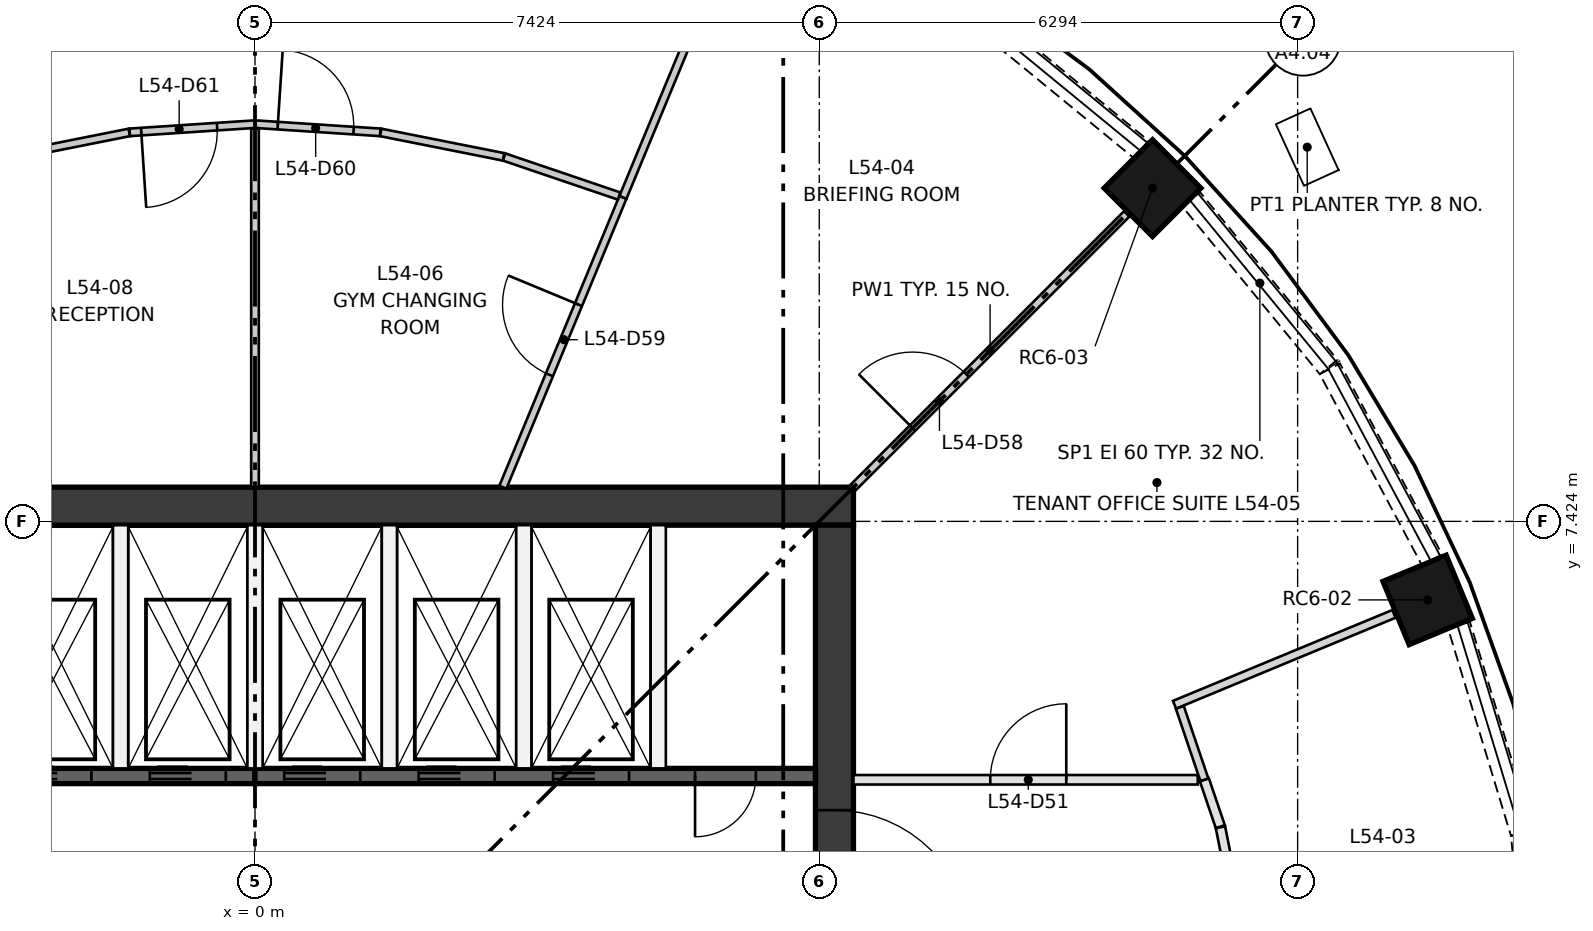
"""IFC4 building model, lengths in metres.
Left out: names, types, materials, properties, quantities, classifications, styles, units other than length and angle.
Written with IfcOpenShell. Run it as: python <this file> out.ifc"""

import sys

from ifc_helpers import new_model, si_unit, direction, frame, frame_2d, origin, origin_2d, place, context, subcontext, project, spatial, rectangle, extrude, element, fill, save


model = new_model("IFC4")
c1 = context("Model", 3, precision=1e-05, world=origin(), true_north=direction((0.0, 1.0)))
c2 = subcontext(c1, "Body", "Model", "MODEL_VIEW")
j1 = project(units=[si_unit("LENGTHUNIT", "METRE"), si_unit("PLANEANGLEUNIT", "RADIAN")], contexts=[c1])
p1 = place(None, origin())
s1 = spatial("IfcSite", under=j1, at=p1, CompositionType="ELEMENT")
p2 = place(p1, origin())
s2 = spatial("IfcBuilding", under=s1, at=p2, CompositionType="ELEMENT")
p3 = place(p2, frame((0.0, 0.0, 201.05)))
s3 = spatial("IfcBuildingStorey", under=s2, at=p3, CompositionType="ELEMENT", Elevation=201.05)
for number, where, z_axis, x_axis in (
    (1, (15.429, 6.391, 0.0), (0.0, 0.0, 1.0), (0.924, 0.383, 0.0)),
    (2, (11.809, 11.809, 0.0), (0.0, 0.0, 1.0), (0.707, 0.707, 0.0)),
):
    element("IfcColumn", number, at=place(p3, frame(where, z_axis=z_axis, x_axis=x_axis)), inside=s3, PredefinedType="COLUMN", context=c2, shape_type="SweptSolid", body=[
        extrude(rectangle(XDim=0.9, YDim=0.9, at=origin_2d()), origin(), (0.0, 0.0, 1.0), 2.85),
    ])
p4 = place(p3, frame((-7.874, 7.624, 0.0), z_axis=(0.0, 0.0, 1.0), x_axis=(1.0, 0.0, 0.0)))
e3 = element("IfcWall", 3, at=p4, inside=s3, PredefinedType="SHEAR", context=c2, shape_type="SweptSolid", body=[
    extrude(rectangle(XDim=15.748, YDim=0.5, at=frame_2d((7.874, 0.0))), origin(), (0.0, 0.0, 1.0), 3.35),
])
p5 = place(p3, frame((7.624, -7.374, 0.0), z_axis=(0.0, 0.0, 1.0), x_axis=(0.0, 1.0, 0.0)))
e4 = element("IfcWall", 4, at=p5, inside=s3, PredefinedType="SHEAR", context=c2, shape_type="SweptSolid", body=[
    extrude(rectangle(XDim=14.748, YDim=0.5, at=frame_2d((7.374, 0.0))), origin(), (0.0, 0.0, 1.0), 3.35),
])
p6 = place(p5, frame((6.874, 0.0, 0.0)))
e5 = element("IfcOpeningElement", 5, at=p6, cuts=e4, PredefinedType="OPENING", context=c2, shape_type="SweptSolid", body=[
    extrude(rectangle(XDim=1.0, YDim=2.1, at=frame_2d((0.5, 1.05))), frame((0.0, 0.26, 0.0), z_axis=(0.0, -1.0, 0.0), x_axis=(1.0, 0.0, 0.0)), (0.0, 0.0, 1.0), 0.52),
])
p7 = place(p5, frame((3.75, 0.0, 0.0)))
e6 = element("IfcOpeningElement", 6, at=p7, cuts=e4, PredefinedType="OPENING", context=c2, shape_type="SweptSolid", body=[
    extrude(rectangle(XDim=1.8, YDim=2.1, at=frame_2d((0.9, 1.05))), frame((0.0, 0.26, 0.0), z_axis=(0.0, -1.0, 0.0), x_axis=(1.0, 0.0, 0.0)), (0.0, 0.0, 1.0), 0.52),
])
p8 = place(p5, frame((9.198, 0.0, 0.0)))
e7 = element("IfcOpeningElement", 7, at=p8, cuts=e4, PredefinedType="OPENING", context=c2, shape_type="SweptSolid", body=[
    extrude(rectangle(XDim=1.8, YDim=2.1, at=frame_2d((0.9, 1.05))), frame((0.0, 0.26, 0.0), z_axis=(0.0, -1.0, 0.0), x_axis=(1.0, 0.0, 0.0)), (0.0, 0.0, 1.0), 0.52),
])
p9 = place(p3, frame((-7.374, 4.074, 0.0), z_axis=(0.0, 0.0, 1.0), x_axis=(1.0, 0.0, 0.0)))
e8 = element("IfcWall", 8, at=p9, inside=s3, PredefinedType="SHEAR", context=c2, shape_type="SweptSolid", body=[
    extrude(rectangle(XDim=7.374, YDim=0.2, at=frame_2d((3.687, 0.0))), origin(), (0.0, 0.0, 1.0), 3.0),
])
p10 = place(p9, frame((0.684, 0.0, 0.0)))
e9 = element("IfcOpeningElement", 9, at=p10, cuts=e8, PredefinedType="OPENING", context=c2, shape_type="SweptSolid", body=[
    extrude(rectangle(XDim=1.0, YDim=2.1, at=frame_2d((0.5, 1.05))), frame((0.0, 0.11, 0.0), z_axis=(0.0, -1.0, 0.0), x_axis=(1.0, 0.0, 0.0)), (0.0, 0.0, 1.0), 0.22),
])
p11 = place(p9, frame((2.453, 0.0, 0.0)))
e10 = element("IfcOpeningElement", 10, at=p11, cuts=e8, PredefinedType="OPENING", context=c2, shape_type="SweptSolid", body=[
    extrude(rectangle(XDim=1.0, YDim=2.1, at=frame_2d((0.5, 1.05))), frame((0.0, 0.11, 0.0), z_axis=(0.0, -1.0, 0.0), x_axis=(1.0, 0.0, 0.0)), (0.0, 0.0, 1.0), 0.22),
])
p12 = place(p9, frame((4.221, 0.0, 0.0)))
e11 = element("IfcOpeningElement", 11, at=p12, cuts=e8, PredefinedType="OPENING", context=c2, shape_type="SweptSolid", body=[
    extrude(rectangle(XDim=1.0, YDim=2.1, at=frame_2d((0.5, 1.05))), frame((0.0, 0.11, 0.0), z_axis=(0.0, -1.0, 0.0), x_axis=(1.0, 0.0, 0.0)), (0.0, 0.0, 1.0), 0.22),
])
p13 = place(p9, frame((5.99, 0.0, 0.0)))
e12 = element("IfcOpeningElement", 12, at=p13, cuts=e8, PredefinedType="OPENING", context=c2, shape_type="SweptSolid", body=[
    extrude(rectangle(XDim=1.0, YDim=2.1, at=frame_2d((0.5, 1.05))), frame((0.0, 0.11, 0.0), z_axis=(0.0, -1.0, 0.0), x_axis=(1.0, 0.0, 0.0)), (0.0, 0.0, 1.0), 0.22),
])
p14 = place(p3, frame((0.0, 4.074, 0.0), z_axis=(0.0, 0.0, 1.0), x_axis=(1.0, 0.0, 0.0)))
e13 = element("IfcWall", 13, at=p14, inside=s3, PredefinedType="SHEAR", context=c2, shape_type="SweptSolid", body=[
    extrude(rectangle(XDim=7.374, YDim=0.2, at=frame_2d((3.687, 0.0))), origin(), (0.0, 0.0, 1.0), 3.0),
])
p15 = place(p14, frame((0.384, 0.0, 0.0)))
e14 = element("IfcOpeningElement", 14, at=p15, cuts=e13, PredefinedType="OPENING", context=c2, shape_type="SweptSolid", body=[
    extrude(rectangle(XDim=1.0, YDim=2.1, at=frame_2d((0.5, 1.05))), frame((0.0, 0.11, 0.0), z_axis=(0.0, -1.0, 0.0), x_axis=(1.0, 0.0, 0.0)), (0.0, 0.0, 1.0), 0.22),
])
p16 = place(p14, frame((2.153, 0.0, 0.0)))
e15 = element("IfcOpeningElement", 15, at=p16, cuts=e13, PredefinedType="OPENING", context=c2, shape_type="SweptSolid", body=[
    extrude(rectangle(XDim=1.0, YDim=2.1, at=frame_2d((0.5, 1.05))), frame((0.0, 0.11, 0.0), z_axis=(0.0, -1.0, 0.0), x_axis=(1.0, 0.0, 0.0)), (0.0, 0.0, 1.0), 0.22),
])
p17 = place(p14, frame((3.921, 0.0, 0.0)))
e16 = element("IfcOpeningElement", 16, at=p17, cuts=e13, PredefinedType="OPENING", context=c2, shape_type="SweptSolid", body=[
    extrude(rectangle(XDim=1.0, YDim=2.1, at=frame_2d((0.5, 1.05))), frame((0.0, 0.11, 0.0), z_axis=(0.0, -1.0, 0.0), x_axis=(1.0, 0.0, 0.0)), (0.0, 0.0, 1.0), 0.22),
])
p18 = place(p14, frame((5.79, 0.0, 0.0)))
e17 = element("IfcOpeningElement", 17, at=p18, cuts=e13, PredefinedType="OPENING", context=c2, shape_type="SweptSolid", body=[
    extrude(rectangle(XDim=0.8, YDim=2.1, at=frame_2d((0.4, 1.05))), frame((0.0, 0.11, 0.0), z_axis=(0.0, -1.0, 0.0), x_axis=(1.0, 0.0, 0.0)), (0.0, 0.0, 1.0), 0.22),
])
for number, where, z_axis, x_axis in (
    (18, (-1.769, 4.174, 0.0), (0.0, 0.0, 1.0), (0.0, 1.0, 0.0)),
    (19, (0.0, 4.174, 0.0), (0.0, 0.0, 1.0), (0.0, 1.0, 0.0)),
    (20, (1.769, 4.174, 0.0), (0.0, 0.0, 1.0), (0.0, 1.0, 0.0)),
    (21, (3.537, 4.174, 0.0), (0.0, 0.0, 1.0), (0.0, 1.0, 0.0)),
    (22, (5.305, 4.174, 0.0), (0.0, 0.0, 1.0), (0.0, 1.0, 0.0)),
):
    element("IfcWall", number, at=place(p3, frame(where, z_axis=z_axis, x_axis=x_axis)), inside=s3, PredefinedType="PARTITIONING", context=c2, shape_type="SweptSolid", body=[
        extrude(rectangle(XDim=3.2, YDim=0.2, at=frame_2d((1.6, 0.0))), origin(), (0.0, 0.0, 1.0), 3.0),
    ])
p19 = place(p3, frame((16.955, 0.464, 0.0), z_axis=(0.0, 0.0, 1.0), x_axis=(-0.098223350935, 0.995164395128, 0.0)))
e23 = element("IfcWall", 23, at=p19, inside=s3, PredefinedType="SOLIDWALL", context=c2, shape_type="SweptSolid", body=[
    extrude(rectangle(XDim=2.851, YDim=0.3, at=frame_2d((1.425, 0.0))), origin(), (0.0, 0.0, 1.0), 0.9),
])
p20 = place(p3, frame((16.669, 3.33, 0.0), z_axis=(0.0, 0.0, 1.0), x_axis=(-0.290432618929, 0.956895445627, 0.0)))
e24 = element("IfcWall", 24, at=p20, inside=s3, PredefinedType="SOLIDWALL", context=c2, shape_type="SweptSolid", body=[
    extrude(rectangle(XDim=2.852, YDim=0.3, at=frame_2d((1.426, 0.0))), origin(), (0.0, 0.0, 1.0), 0.9),
])
p21 = place(p3, frame((15.486, 6.917, 0.0), z_axis=(0.0, 0.0, 1.0), x_axis=(-0.471441594872, 0.881897285756, 0.0)))
e25 = element("IfcWall", 25, at=p21, inside=s3, PredefinedType="SOLIDWALL", context=c2, shape_type="SweptSolid", body=[
    extrude(rectangle(XDim=2.85, YDim=0.3, at=frame_2d((1.425, 0.0))), origin(), (0.0, 0.0, 1.0), 0.9),
])
for number, where, z_axis, x_axis in (
    (26, (14.125, 9.456, 0.0), (0.0, 0.0, 1.0), (-0.634, 0.773, 0.0)),
    (27, (11.661, 12.316, 0.0), (0.0, 0.0, 1.0), (-0.773, 0.634, 0.0)),
):
    element("IfcWall", number, at=place(p3, frame(where, z_axis=z_axis, x_axis=x_axis)), inside=s3, PredefinedType="SOLIDWALL", context=c2, shape_type="SweptSolid", body=[
        extrude(rectangle(XDim=2.853, YDim=0.3, at=frame_2d((1.426, 0.0))), origin(), (0.0, 0.0, 1.0), 0.9),
    ])
p22 = place(p3, frame((12.491, 4.024, 0.0), z_axis=(0.0, 0.0, 1.0), x_axis=(0.321506357846, -0.946907419902, 0.0)))
e28 = element("IfcWall", 28, at=p22, inside=s3, PredefinedType="PARTITIONING", context=c2, shape_type="SweptSolid", body=[
    extrude(rectangle(XDim=0.652, YDim=0.125, at=frame_2d((0.326, 0.0))), origin(), (0.0, 0.0, 1.0), 3.0),
])
p23 = place(p3, frame((12.703, 3.399, 0.0), z_axis=(0.0, 0.0, 1.0), x_axis=(0.195101249107, -0.980783106806, 0.0)))
e29 = element("IfcWall", 29, at=p23, inside=s3, PredefinedType="PARTITIONING", context=c2, shape_type="SweptSolid", body=[
    extrude(rectangle(XDim=1.712, YDim=0.125, at=frame_2d((0.856, 0.0))), origin(), (0.0, 0.0, 1.0), 3.0),
])
p24 = place(p3, frame((7.874, 4.024, 0.0), z_axis=(0.0, 0.0, 1.0), x_axis=(1.0, 0.0, 0.0)))
e30 = element("IfcWall", 30, at=p24, inside=s3, PredefinedType="PARTITIONING", context=c2, shape_type="SweptSolid", body=[
    extrude(rectangle(XDim=4.53, YDim=0.125, at=frame_2d((2.265, 0.0))), origin(), (0.0, 0.0, 1.0), 3.0),
])
p25 = place(p24, frame((1.8, 0.0, 0.0)))
e31 = element("IfcOpeningElement", 31, at=p25, cuts=e30, PredefinedType="OPENING", context=c2, shape_type="SweptSolid", body=[
    extrude(rectangle(XDim=1.0, YDim=2.1, at=frame_2d((0.5, 1.05))), frame((0.0, 0.073, 0.0), z_axis=(0.0, -1.0, 0.0), x_axis=(1.0, 0.0, 0.0)), (0.0, 0.0, 1.0), 0.145),
])
p26 = place(p3, frame((12.098, 5.011, 0.0), z_axis=(0.0, 0.0, 1.0), x_axis=(0.923893054844, 0.382650784934, 0.0)))
e32 = element("IfcWall", 32, at=p26, inside=s3, PredefinedType="PARTITIONING", context=c2, shape_type="SweptSolid", body=[
    extrude(rectangle(XDim=3.125, YDim=0.11, at=frame_2d((1.562, 0.0))), origin(), (0.0, 0.0, 1.0), 3.0),
])
p27 = place(p3, frame((12.491, 4.024, 0.0), z_axis=(0.0, 0.0, 1.0), x_axis=(-0.321393524097, 0.94694572319, 0.0)))
e33 = element("IfcWall", 33, at=p27, inside=s3, PredefinedType="PARTITIONING", context=c2, shape_type="SweptSolid", body=[
    extrude(rectangle(XDim=1.006, YDim=0.11, at=frame_2d((0.503, 0.0))), origin(), (0.0, 0.0, 1.0), 3.0),
])
p28 = place(p3, frame((7.874, 7.874, 0.0), z_axis=(0.0, 0.0, 1.0), x_axis=(0.707106781187, 0.707106781187, 0.0)))
e34 = element("IfcWall", 34, at=p28, inside=s3, PredefinedType="PARTITIONING", context=c2, shape_type="SweptSolid", body=[
    extrude(rectangle(XDim=5.084, YDim=0.1, at=frame_2d((2.542, 0.0))), origin(), (0.0, 0.0, 1.0), 3.0),
])
p29 = place(p28, frame((1.1, 0.0, 0.0)))
e35 = element("IfcOpeningElement", 35, at=p29, cuts=e34, PredefinedType="OPENING", context=c2, shape_type="SweptSolid", body=[
    extrude(rectangle(XDim=1.0, YDim=2.1, at=frame_2d((0.5, 1.05))), frame((0.0, 0.06, 0.0), z_axis=(0.0, -1.0, 0.0), x_axis=(1.0, 0.0, 0.0)), (0.0, 0.0, 1.0), 0.12),
])
p30 = place(p3, frame((3.261, 7.874, 0.0), z_axis=(0.0, 0.0, 1.0), x_axis=(0.382673969281, 0.923883452192, 0.0)))
e36 = element("IfcWall", 36, at=p30, inside=s3, PredefinedType="PARTITIONING", context=c2, shape_type="SweptSolid", body=[
    extrude(rectangle(XDim=4.127, YDim=0.1, at=frame_2d((2.063, 0.0))), origin(), (0.0, 0.0, 1.0), 3.0),
])
p31 = place(p30, frame((1.6, 0.0, 0.0)))
e37 = element("IfcOpeningElement", 37, at=p31, cuts=e36, PredefinedType="OPENING", context=c2, shape_type="SweptSolid", body=[
    extrude(rectangle(XDim=1.0, YDim=2.1, at=frame_2d((0.5, 1.05))), frame((0.0, 0.06, 0.0), z_axis=(0.0, -1.0, 0.0), x_axis=(1.0, 0.0, 0.0)), (0.0, 0.0, 1.0), 0.12),
])
p32 = place(p3, frame((4.841, 11.687, 0.0), z_axis=(0.0, 0.0, 1.0), x_axis=(0.382681959822, 0.923880142457, 0.0)))
e38 = element("IfcWall", 38, at=p32, inside=s3, PredefinedType="PARTITIONING", context=c2, shape_type="SweptSolid", body=[
    extrude(rectangle(XDim=3.57, YDim=0.1, at=frame_2d((1.785, 0.0))), origin(), (0.0, 0.0, 1.0), 3.0),
])
p33 = place(p3, frame((0.0, 12.65, 0.0), z_axis=(0.0, 0.0, 1.0), x_axis=(0.997862957787, -0.065341544791, 0.0)))
e39 = element("IfcWall", 39, at=p33, inside=s3, PredefinedType="PARTITIONING", context=c2, shape_type="SweptSolid", body=[
    extrude(rectangle(XDim=1.651, YDim=0.1, at=frame_2d((0.826, 0.0))), origin(), (0.0, 0.0, 1.0), 3.0),
])
p34 = place(p33, frame((0.3, 0.0, 0.0)))
e40 = element("IfcOpeningElement", 40, at=p34, cuts=e39, PredefinedType="OPENING", context=c2, shape_type="SweptSolid", body=[
    extrude(rectangle(XDim=1.0, YDim=2.1, at=frame_2d((0.5, 1.05))), frame((0.0, 0.06, 0.0), z_axis=(0.0, -1.0, 0.0), x_axis=(1.0, 0.0, 0.0)), (0.0, 0.0, 1.0), 0.12),
])
p35 = place(p3, frame((1.654, 12.541, 0.0), z_axis=(0.0, 0.0, 1.0), x_axis=(0.98076253728, -0.195204624605, 0.0)))
e41 = element("IfcWall", 41, at=p35, inside=s3, PredefinedType="PARTITIONING", context=c2, shape_type="SweptSolid", body=[
    extrude(rectangle(XDim=1.648, YDim=0.1, at=frame_2d((0.824, 0.0))), origin(), (0.0, 0.0, 1.0), 3.0),
])
p36 = place(p3, frame((3.277, 12.218, 0.0), z_axis=(0.0, 0.0, 1.0), x_axis=(0.946927222845, -0.321448027891, 0.0)))
e42 = element("IfcWall", 42, at=p36, inside=s3, PredefinedType="PARTITIONING", context=c2, shape_type="SweptSolid", body=[
    extrude(rectangle(XDim=1.598, YDim=0.1, at=frame_2d((0.799, 0.0))), origin(), (0.0, 0.0, 1.0), 3.0),
])
p37 = place(p3, frame((0.0, 7.874, 0.0), z_axis=(0.0, 0.0, 1.0), x_axis=(0.0, 1.0, 0.0)))
e43 = element("IfcWall", 43, at=p37, inside=s3, PredefinedType="PARTITIONING", context=c2, shape_type="SweptSolid", body=[
    extrude(rectangle(XDim=4.723, YDim=0.1, at=frame_2d((2.361, 0.0))), origin(), (0.0, 0.0, 1.0), 3.0),
])
p38 = place(p3, frame((-1.654, 12.541, 0.0), z_axis=(0.0, 0.0, 1.0), x_axis=(-0.98076253728, -0.195204624605, 0.0)))
e44 = element("IfcWall", 44, at=p38, inside=s3, PredefinedType="PARTITIONING", context=c2, shape_type="SweptSolid", body=[
    extrude(rectangle(XDim=1.648, YDim=0.1, at=frame_2d((0.824, 0.0))), origin(), (0.0, 0.0, 1.0), 3.0),
])
p39 = place(p3, frame((0.0, 12.65, 0.0), z_axis=(0.0, 0.0, 1.0), x_axis=(-0.997862957787, -0.065341544791, 0.0)))
e45 = element("IfcWall", 45, at=p39, inside=s3, PredefinedType="PARTITIONING", context=c2, shape_type="SweptSolid", body=[
    extrude(rectangle(XDim=1.651, YDim=0.1, at=frame_2d((0.826, 0.0))), origin(), (0.0, 0.0, 1.0), 3.0),
])
p40 = place(p39, frame((0.5, 0.0, 0.0)))
e46 = element("IfcOpeningElement", 46, at=p40, cuts=e45, PredefinedType="OPENING", context=c2, shape_type="SweptSolid", body=[
    extrude(rectangle(XDim=1.0, YDim=2.1, at=frame_2d((0.5, 1.05))), frame((0.0, 0.06, 0.0), z_axis=(0.0, -1.0, 0.0), x_axis=(1.0, 0.0, 0.0)), (0.0, 0.0, 1.0), 0.12),
])
p41 = place(p12, frame((1.0, 0.0, 0.0), z_axis=(0.0, 0.0, 1.0), x_axis=(-1.0, 0.0, 0.0)))
e47 = element("IfcDoor", 47, at=p41, inside=s3, OperationType="DOUBLE_DOOR_SLIDING", PredefinedType="DOOR", context=c2, shape_type="SweptSolid", body=[
    extrude(rectangle(XDim=1.0, YDim=2.1, at=frame_2d((0.5, 1.05))), frame((0.0, 0.025, 0.0), z_axis=(0.0, -1.0, 0.0), x_axis=(1.0, 0.0, 0.0)), (0.0, 0.0, 1.0), 0.05),
])
fill(e11, e47)
p42 = place(p13, frame((1.0, 0.0, 0.0), z_axis=(0.0, 0.0, 1.0), x_axis=(-1.0, 0.0, 0.0)))
e48 = element("IfcDoor", 48, at=p42, inside=s3, OperationType="DOUBLE_DOOR_SLIDING", PredefinedType="DOOR", context=c2, shape_type="SweptSolid", body=[
    extrude(rectangle(XDim=1.0, YDim=2.1, at=frame_2d((0.5, 1.05))), frame((0.0, 0.025, 0.0), z_axis=(0.0, -1.0, 0.0), x_axis=(1.0, 0.0, 0.0)), (0.0, 0.0, 1.0), 0.05),
])
fill(e12, e48)
p43 = place(p15, frame((1.0, 0.0, 0.0), z_axis=(0.0, 0.0, 1.0), x_axis=(-1.0, 0.0, 0.0)))
e49 = element("IfcDoor", 49, at=p43, inside=s3, OperationType="DOUBLE_DOOR_SLIDING", PredefinedType="DOOR", context=c2, shape_type="SweptSolid", body=[
    extrude(rectangle(XDim=1.0, YDim=2.1, at=frame_2d((0.5, 1.05))), frame((0.0, 0.025, 0.0), z_axis=(0.0, -1.0, 0.0), x_axis=(1.0, 0.0, 0.0)), (0.0, 0.0, 1.0), 0.05),
])
fill(e14, e49)
p44 = place(p16, frame((1.0, 0.0, 0.0), z_axis=(0.0, 0.0, 1.0), x_axis=(-1.0, 0.0, 0.0)))
e50 = element("IfcDoor", 50, at=p44, inside=s3, OperationType="DOUBLE_DOOR_SLIDING", PredefinedType="DOOR", context=c2, shape_type="SweptSolid", body=[
    extrude(rectangle(XDim=1.0, YDim=2.1, at=frame_2d((0.5, 1.05))), frame((0.0, 0.025, 0.0), z_axis=(0.0, -1.0, 0.0), x_axis=(1.0, 0.0, 0.0)), (0.0, 0.0, 1.0), 0.05),
])
fill(e15, e50)
p45 = place(p17, frame((1.0, 0.0, 0.0), z_axis=(0.0, 0.0, 1.0), x_axis=(-1.0, 0.0, 0.0)))
e51 = element("IfcDoor", 51, at=p45, inside=s3, OperationType="DOUBLE_DOOR_SLIDING", PredefinedType="DOOR", context=c2, shape_type="SweptSolid", body=[
    extrude(rectangle(XDim=1.0, YDim=2.1, at=frame_2d((0.5, 1.05))), frame((0.0, 0.025, 0.0), z_axis=(0.0, -1.0, 0.0), x_axis=(1.0, 0.0, 0.0)), (0.0, 0.0, 1.0), 0.05),
])
fill(e16, e51)
p46 = place(p18, frame((0.8, 0.0, 0.0), z_axis=(0.0, 0.0, 1.0), x_axis=(-1.0, 0.0, 0.0)))
e52 = element("IfcDoor", 52, at=p46, inside=s3, OperationType="SINGLE_SWING_LEFT", PredefinedType="DOOR", context=c2, shape_type="SweptSolid", body=[
    extrude(rectangle(XDim=0.8, YDim=2.1, at=frame_2d((0.4, 1.05))), frame((0.0, 0.025, 0.0), z_axis=(0.0, -1.0, 0.0), x_axis=(1.0, 0.0, 0.0)), (0.0, 0.0, 1.0), 0.05),
])
fill(e17, e52)
p47 = place(p8, frame((1.8, 0.0, 0.0), z_axis=(0.0, 0.0, 1.0), x_axis=(-1.0, 0.0, 0.0)))
e53 = element("IfcDoor", 53, at=p47, inside=s3, OperationType="DOUBLE_DOOR_SINGLE_SWING", PredefinedType="DOOR", context=c2, shape_type="SweptSolid", body=[
    extrude(rectangle(XDim=1.8, YDim=2.1, at=frame_2d((0.9, 1.05))), frame((0.0, 0.025, 0.0), z_axis=(0.0, -1.0, 0.0), x_axis=(1.0, 0.0, 0.0)), (0.0, 0.0, 1.0), 0.05),
])
fill(e7, e53)
p48 = place(p25, origin())
e54 = element("IfcDoor", 54, at=p48, inside=s3, OperationType="SINGLE_SWING_RIGHT", PredefinedType="DOOR", context=c2, shape_type="SweptSolid", body=[
    extrude(rectangle(XDim=1.0, YDim=2.1, at=frame_2d((0.5, 1.05))), frame((0.0, 0.025, 0.0), z_axis=(0.0, -1.0, 0.0), x_axis=(1.0, 0.0, 0.0)), (0.0, 0.0, 1.0), 0.05),
])
fill(e31, e54)
p49 = place(p29, origin())
e55 = element("IfcDoor", 55, at=p49, inside=s3, OperationType="SINGLE_SWING_LEFT", PredefinedType="DOOR", context=c2, shape_type="SweptSolid", body=[
    extrude(rectangle(XDim=1.0, YDim=2.1, at=frame_2d((0.5, 1.05))), frame((0.0, 0.025, 0.0), z_axis=(0.0, -1.0, 0.0), x_axis=(1.0, 0.0, 0.0)), (0.0, 0.0, 1.0), 0.05),
])
fill(e35, e55)
p50 = place(p31, origin())
e56 = element("IfcDoor", 56, at=p50, inside=s3, OperationType="SINGLE_SWING_RIGHT", PredefinedType="DOOR", context=c2, shape_type="SweptSolid", body=[
    extrude(rectangle(XDim=1.0, YDim=2.1, at=frame_2d((0.5, 1.05))), frame((0.0, 0.025, 0.0), z_axis=(0.0, -1.0, 0.0), x_axis=(1.0, 0.0, 0.0)), (0.0, 0.0, 1.0), 0.05),
])
fill(e37, e56)
p51 = place(p34, origin())
e57 = element("IfcDoor", 57, at=p51, inside=s3, OperationType="SINGLE_SWING_LEFT", PredefinedType="DOOR", context=c2, shape_type="SweptSolid", body=[
    extrude(rectangle(XDim=1.0, YDim=2.1, at=frame_2d((0.5, 1.05))), frame((0.0, 0.025, 0.0), z_axis=(0.0, -1.0, 0.0), x_axis=(1.0, 0.0, 0.0)), (0.0, 0.0, 1.0), 0.05),
])
fill(e40, e57)
p52 = place(p40, origin())
e58 = element("IfcDoor", 58, at=p52, inside=s3, OperationType="SINGLE_SWING_RIGHT", PredefinedType="DOOR", context=c2, shape_type="SweptSolid", body=[
    extrude(rectangle(XDim=1.0, YDim=2.1, at=frame_2d((0.5, 1.05))), frame((0.0, 0.025, 0.0), z_axis=(0.0, -1.0, 0.0), x_axis=(1.0, 0.0, 0.0)), (0.0, 0.0, 1.0), 0.05),
])
fill(e46, e58)
save(model, sys.argv[1])
